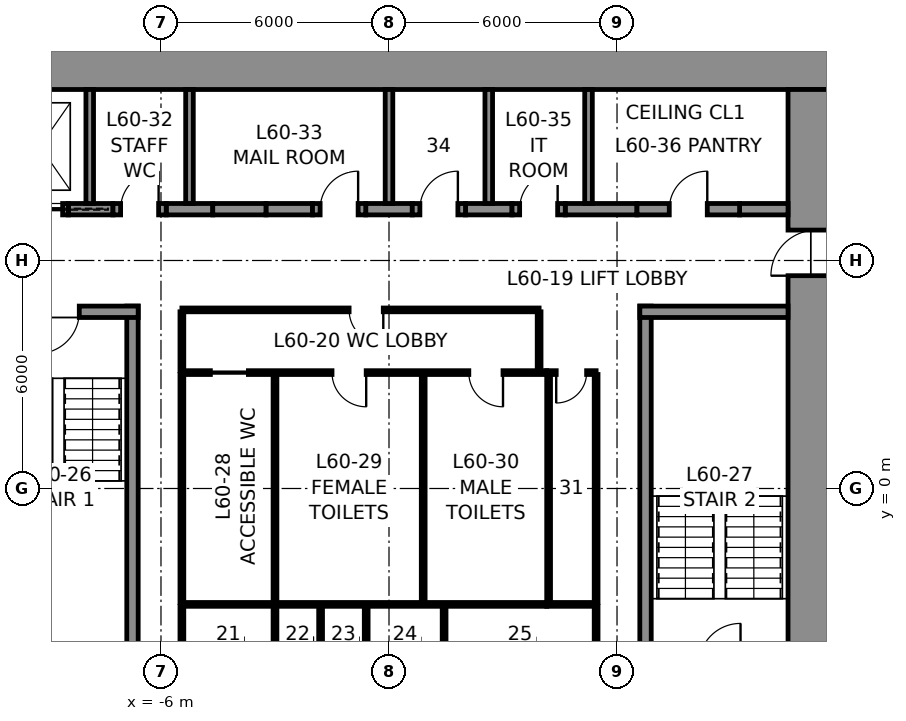
"""IFC4 building model, lengths in metres.
Left out: names, types, materials, properties, quantities, classifications, styles, units other than length and angle.
Written with IfcOpenShell. Run it as: python <this file> out.ifc"""

import sys

from ifc_helpers import new_model, si_unit, direction, frame, frame_2d, origin, place, context, subcontext, project, spatial, rectangle, extrude, element, fill, save


model = new_model("IFC4")
c1 = context("Model", 3, precision=1e-05, world=origin(), true_north=direction((0.0, 1.0)))
c2 = subcontext(c1, "Body", "Model", "MODEL_VIEW")
j1 = project(units=[si_unit("LENGTHUNIT", "METRE"), si_unit("PLANEANGLEUNIT", "RADIAN")], contexts=[c1])
p1 = place(None, origin())
s1 = spatial("IfcSite", under=j1, at=p1, CompositionType="ELEMENT")
p2 = place(p1, origin())
s2 = spatial("IfcBuilding", under=s1, at=p2, CompositionType="ELEMENT")
p3 = place(p2, frame((0.0, 0.0, 269.8)))
s3 = spatial("IfcBuildingStorey", under=s2, at=p3, CompositionType="ELEMENT", Elevation=269.8)
p4 = place(p3, frame((-12.0, 11.25, 0.0), z_axis=(0.0, 0.0, 1.0), x_axis=(1.0, 0.0, 0.0)))
e1 = element("IfcWall", 1, at=p4, inside=s3, PredefinedType="SHEAR", context=c2, shape_type="SweptSolid", body=[
    extrude(rectangle(XDim=24.0, YDim=1.5, at=frame_2d((12.0, 0.0))), origin(), (0.0, 0.0, 1.0), 4.0),
])
p5 = place(p3, frame((11.25, 10.5, 0.0), z_axis=(0.0, 0.0, 1.0), x_axis=(0.0, -1.0, 0.0)))
e2 = element("IfcWall", 2, at=p5, inside=s3, PredefinedType="SHEAR", context=c2, shape_type="SweptSolid", body=[
    extrude(rectangle(XDim=21.0, YDim=1.5, at=frame_2d((10.5, 0.0))), origin(), (0.0, 0.0, 1.0), 4.0),
])
p6 = place(p5, frame((3.7, 0.0, 0.0)))
e3 = element("IfcOpeningElement", 3, at=p6, cuts=e2, PredefinedType="OPENING", context=c2, shape_type="SweptSolid", body=[
    extrude(rectangle(XDim=1.2, YDim=2.3, at=frame_2d((0.6, 1.15))), frame((0.0, 0.76, 0.0), z_axis=(0.0, -1.0, 0.0), x_axis=(1.0, 0.0, 0.0)), (0.0, 0.0, 1.0), 1.52),
])
p7 = place(p5, frame((16.1, 0.0, 0.0)))
e4 = element("IfcOpeningElement", 4, at=p7, cuts=e2, PredefinedType="OPENING", context=c2, shape_type="SweptSolid", body=[
    extrude(rectangle(XDim=1.2, YDim=2.3, at=frame_2d((0.6, 1.15))), frame((0.0, 0.76, 0.0), z_axis=(0.0, -1.0, 0.0), x_axis=(1.0, 0.0, 0.0)), (0.0, 0.0, 1.0), 1.52),
])
p8 = place(p3, frame((-8.438, 7.35, 0.0), z_axis=(0.0, 0.0, 1.0), x_axis=(1.0, 0.0, 0.0)))
e5 = element("IfcWall", 5, at=p8, inside=s3, PredefinedType="SHEAR", context=c2, shape_type="SweptSolid", body=[
    extrude(rectangle(XDim=1.175, YDim=0.3, at=frame_2d((0.587, 0.0))), origin(), (0.0, 0.0, 1.0), 4.0),
])
for number, where, z_axis, x_axis in (
    (6, (-5.863, 7.35, 0.0), (0.0, 0.0, 1.0), (1.0, 0.0, 0.0)),
    (7, (-3.238, 7.35, 0.0), (0.0, 0.0, 1.0), (1.0, 0.0, 0.0)),
    (8, (-0.613, 7.35, 0.0), (0.0, 0.0, 1.0), (1.0, 0.0, 0.0)),
    (9, (2.012, 7.35, 0.0), (0.0, 0.0, 1.0), (1.0, 0.0, 0.0)),
):
    element("IfcWall", number, at=place(p3, frame(where, z_axis=z_axis, x_axis=x_axis)), inside=s3, PredefinedType="SHEAR", context=c2, shape_type="SweptSolid", body=[
        extrude(rectangle(XDim=1.225, YDim=0.3, at=frame_2d((0.613, 0.0))), origin(), (0.0, 0.0, 1.0), 4.0),
    ])
p9 = place(p3, frame((4.637, 7.35, 0.0), z_axis=(0.0, 0.0, 1.0), x_axis=(1.0, 0.0, 0.0)))
e10 = element("IfcWall", 10, at=p9, inside=s3, PredefinedType="SHEAR", context=c2, shape_type="SweptSolid", body=[
    extrude(rectangle(XDim=1.887, YDim=0.3, at=frame_2d((0.944, 0.0))), origin(), (0.0, 0.0, 1.0), 4.0),
])
p10 = place(p3, frame((9.225, 7.35, 0.0), z_axis=(0.0, 0.0, 1.0), x_axis=(1.0, 0.0, 0.0)))
e11 = element("IfcWall", 11, at=p10, inside=s3, PredefinedType="SHEAR", context=c2, shape_type="SweptSolid", body=[
    extrude(rectangle(XDim=1.275, YDim=0.3, at=frame_2d((0.637, 0.0))), origin(), (0.0, 0.0, 1.0), 4.0),
])
p11 = place(p3, frame((-9.938, 7.35, 0.0), z_axis=(0.0, 0.0, 1.0), x_axis=(1.0, 0.0, 0.0)))
e12 = element("IfcWall", 12, at=p11, inside=s3, PredefinedType="PARTITIONING", context=c2, shape_type="SweptSolid", body=[
    extrude(rectangle(XDim=1.5, YDim=0.3, at=frame_2d((0.75, 0.0))), origin(), (0.0, 0.0, 1.0), 4.0),
])
p12 = place(p11, frame((0.15, 0.0, 0.0)))
e13 = element("IfcOpeningElement", 13, at=p12, cuts=e12, PredefinedType="OPENING", context=c2, shape_type="SweptSolid", body=[
    extrude(rectangle(XDim=1.2, YDim=2.3, at=frame_2d((0.6, 1.15))), frame((0.0, 0.16, 0.0), z_axis=(0.0, -1.0, 0.0), x_axis=(1.0, 0.0, 0.0)), (0.0, 0.0, 1.0), 0.32),
])
p13 = place(p3, frame((-7.262, 7.35, 0.0), z_axis=(0.0, 0.0, 1.0), x_axis=(1.0, 0.0, 0.0)))
e14 = element("IfcWall", 14, at=p13, inside=s3, PredefinedType="PARTITIONING", context=c2, shape_type="SweptSolid", body=[
    extrude(rectangle(XDim=1.4, YDim=0.3, at=frame_2d((0.7, 0.0))), origin(), (0.0, 0.0, 1.0), 4.0),
])
p14 = place(p13, frame((0.2, 0.0, 0.0)))
e15 = element("IfcOpeningElement", 15, at=p14, cuts=e14, PredefinedType="OPENING", context=c2, shape_type="SweptSolid", body=[
    extrude(rectangle(XDim=1.0, YDim=2.3, at=frame_2d((0.5, 1.15))), frame((0.0, 0.16, 0.0), z_axis=(0.0, -1.0, 0.0), x_axis=(1.0, 0.0, 0.0)), (0.0, 0.0, 1.0), 0.32),
])
p15 = place(p3, frame((-4.637, 7.35, 0.0), z_axis=(0.0, 0.0, 1.0), x_axis=(1.0, 0.0, 0.0)))
e16 = element("IfcWall", 16, at=p15, inside=s3, PredefinedType="PARTITIONING", context=c2, shape_type="SweptSolid", body=[
    extrude(rectangle(XDim=1.4, YDim=0.3, at=frame_2d((0.7, 0.0))), origin(), (0.0, 0.0, 1.0), 4.0),
])
p16 = place(p3, frame((-2.012, 7.35, 0.0), z_axis=(0.0, 0.0, 1.0), x_axis=(1.0, 0.0, 0.0)))
e17 = element("IfcWall", 17, at=p16, inside=s3, PredefinedType="PARTITIONING", context=c2, shape_type="SweptSolid", body=[
    extrude(rectangle(XDim=1.4, YDim=0.3, at=frame_2d((0.7, 0.0))), origin(), (0.0, 0.0, 1.0), 4.0),
])
p17 = place(p16, frame((0.2, 0.0, 0.0)))
e18 = element("IfcOpeningElement", 18, at=p17, cuts=e17, PredefinedType="OPENING", context=c2, shape_type="SweptSolid", body=[
    extrude(rectangle(XDim=1.0, YDim=2.3, at=frame_2d((0.5, 1.15))), frame((0.0, 0.16, 0.0), z_axis=(0.0, -1.0, 0.0), x_axis=(1.0, 0.0, 0.0)), (0.0, 0.0, 1.0), 0.32),
])
p18 = place(p3, frame((0.613, 7.35, 0.0), z_axis=(0.0, 0.0, 1.0), x_axis=(1.0, 0.0, 0.0)))
e19 = element("IfcWall", 19, at=p18, inside=s3, PredefinedType="PARTITIONING", context=c2, shape_type="SweptSolid", body=[
    extrude(rectangle(XDim=1.4, YDim=0.3, at=frame_2d((0.7, 0.0))), origin(), (0.0, 0.0, 1.0), 4.0),
])
p19 = place(p18, frame((0.2, 0.0, 0.0)))
e20 = element("IfcOpeningElement", 20, at=p19, cuts=e19, PredefinedType="OPENING", context=c2, shape_type="SweptSolid", body=[
    extrude(rectangle(XDim=1.0, YDim=2.3, at=frame_2d((0.5, 1.15))), frame((0.0, 0.16, 0.0), z_axis=(0.0, -1.0, 0.0), x_axis=(1.0, 0.0, 0.0)), (0.0, 0.0, 1.0), 0.32),
])
p20 = place(p3, frame((3.238, 7.35, 0.0), z_axis=(0.0, 0.0, 1.0), x_axis=(1.0, 0.0, 0.0)))
e21 = element("IfcWall", 21, at=p20, inside=s3, PredefinedType="PARTITIONING", context=c2, shape_type="SweptSolid", body=[
    extrude(rectangle(XDim=1.4, YDim=0.3, at=frame_2d((0.7, 0.0))), origin(), (0.0, 0.0, 1.0), 4.0),
])
p21 = place(p20, frame((0.2, 0.0, 0.0)))
e22 = element("IfcOpeningElement", 22, at=p21, cuts=e21, PredefinedType="OPENING", context=c2, shape_type="SweptSolid", body=[
    extrude(rectangle(XDim=1.0, YDim=2.3, at=frame_2d((0.5, 1.15))), frame((0.0, 0.16, 0.0), z_axis=(0.0, -1.0, 0.0), x_axis=(1.0, 0.0, 0.0)), (0.0, 0.0, 1.0), 0.32),
])
p22 = place(p3, frame((6.525, 7.35, 0.0), z_axis=(0.0, 0.0, 1.0), x_axis=(1.0, 0.0, 0.0)))
e23 = element("IfcWall", 23, at=p22, inside=s3, PredefinedType="PARTITIONING", context=c2, shape_type="SweptSolid", body=[
    extrude(rectangle(XDim=2.7, YDim=0.3, at=frame_2d((1.35, 0.0))), origin(), (0.0, 0.0, 1.0), 4.0),
])
p23 = place(p22, frame((0.85, 0.0, 0.0)))
e24 = element("IfcOpeningElement", 24, at=p23, cuts=e23, PredefinedType="OPENING", context=c2, shape_type="SweptSolid", body=[
    extrude(rectangle(XDim=1.0, YDim=2.3, at=frame_2d((0.5, 1.15))), frame((0.0, 0.16, 0.0), z_axis=(0.0, -1.0, 0.0), x_axis=(1.0, 0.0, 0.0)), (0.0, 0.0, 1.0), 0.32),
])
for number, where, z_axis, x_axis in (
    (25, (-7.875, 7.5, 0.0), (0.0, 0.0, 1.0), (0.0, 1.0, 0.0)),
    (26, (-5.25, 7.5, 0.0), (0.0, 0.0, 1.0), (0.0, 1.0, 0.0)),
    (27, (0.0, 7.5, 0.0), (0.0, 0.0, 1.0), (0.0, 1.0, 0.0)),
    (28, (2.625, 7.5, 0.0), (0.0, 0.0, 1.0), (0.0, 1.0, 0.0)),
    (29, (5.25, 7.5, 0.0), (0.0, 0.0, 1.0), (0.0, 1.0, 0.0)),
):
    element("IfcWall", number, at=place(p3, frame(where, z_axis=z_axis, x_axis=x_axis)), inside=s3, PredefinedType="PARTITIONING", context=c2, shape_type="SweptSolid", body=[
        extrude(rectangle(XDim=3.0, YDim=0.2, at=frame_2d((1.5, 0.0))), origin(), (0.0, 0.0, 1.0), 4.0),
    ])
p24 = place(p3, frame((-6.75, -4.8, 0.0), z_axis=(0.0, 0.0, 1.0), x_axis=(0.0, 1.0, 0.0)))
e30 = element("IfcWall", 30, at=p24, inside=s3, PredefinedType="SOLIDWALL", context=c2, shape_type="SweptSolid", body=[
    extrude(rectangle(XDim=9.6, YDim=0.3, at=frame_2d((4.8, 0.0))), origin(), (0.0, 0.0, 1.0), 3.75),
])
p25 = place(p3, frame((-10.5, 4.65, 0.0), z_axis=(0.0, 0.0, 1.0), x_axis=(1.0, 0.0, 0.0)))
e31 = element("IfcWall", 31, at=p25, inside=s3, PredefinedType="SOLIDWALL", context=c2, shape_type="SweptSolid", body=[
    extrude(rectangle(XDim=3.9, YDim=0.3, at=frame_2d((1.95, 0.0))), origin(), (0.0, 0.0, 1.0), 3.75),
])
p26 = place(p25, frame((1.25, 0.0, 0.0)))
e32 = element("IfcOpeningElement", 32, at=p26, cuts=e31, PredefinedType="OPENING", context=c2, shape_type="SweptSolid", body=[
    extrude(rectangle(XDim=1.1, YDim=2.3, at=frame_2d((0.55, 1.15))), frame((0.0, 0.16, 0.0), z_axis=(0.0, -1.0, 0.0), x_axis=(1.0, 0.0, 0.0)), (0.0, 0.0, 1.0), 0.32),
])
p27 = place(p3, frame((6.75, -4.8, 0.0), z_axis=(0.0, 0.0, 1.0), x_axis=(0.0, 1.0, 0.0)))
e33 = element("IfcWall", 33, at=p27, inside=s3, PredefinedType="SOLIDWALL", context=c2, shape_type="SweptSolid", body=[
    extrude(rectangle(XDim=9.6, YDim=0.3, at=frame_2d((4.8, 0.0))), origin(), (0.0, 0.0, 1.0), 3.75),
])
p28 = place(p3, frame((6.6, 4.65, 0.0), z_axis=(0.0, 0.0, 1.0), x_axis=(1.0, 0.0, 0.0)))
e34 = element("IfcWall", 34, at=p28, inside=s3, PredefinedType="SOLIDWALL", context=c2, shape_type="SweptSolid", body=[
    extrude(rectangle(XDim=3.9, YDim=0.3, at=frame_2d((1.95, 0.0))), origin(), (0.0, 0.0, 1.0), 3.75),
])
p29 = place(p3, frame((-5.45, 3.05, 0.0), z_axis=(0.0, 0.0, 1.0), x_axis=(1.0, 0.0, 0.0)))
e35 = element("IfcWall", 35, at=p29, inside=s3, PredefinedType="PARTITIONING", context=c2, shape_type="SweptSolid", body=[
    extrude(rectangle(XDim=9.6, YDim=0.1, at=frame_2d((4.8, 0.0))), origin(), (0.0, 0.0, 1.0), 3.75),
])
p30 = place(p29, frame((0.75, 0.0, 0.0)))
e36 = element("IfcOpeningElement", 36, at=p30, cuts=e35, PredefinedType="OPENING", context=c2, shape_type="SweptSolid", body=[
    extrude(rectangle(XDim=1.0, YDim=2.3, at=frame_2d((0.5, 1.15))), frame((0.0, 0.06, 0.0), z_axis=(0.0, -1.0, 0.0), x_axis=(1.0, 0.0, 0.0)), (0.0, 0.0, 1.0), 0.12),
])
p31 = place(p29, frame((3.95, 0.0, 0.0)))
e37 = element("IfcOpeningElement", 37, at=p31, cuts=e35, PredefinedType="OPENING", context=c2, shape_type="SweptSolid", body=[
    extrude(rectangle(XDim=0.9, YDim=2.3, at=frame_2d((0.45, 1.15))), frame((0.0, 0.06, 0.0), z_axis=(0.0, -1.0, 0.0), x_axis=(1.0, 0.0, 0.0)), (0.0, 0.0, 1.0), 0.12),
])
p32 = place(p29, frame((7.55, 0.0, 0.0)))
e38 = element("IfcOpeningElement", 38, at=p32, cuts=e35, PredefinedType="OPENING", context=c2, shape_type="SweptSolid", body=[
    extrude(rectangle(XDim=0.9, YDim=2.3, at=frame_2d((0.45, 1.15))), frame((0.0, 0.06, 0.0), z_axis=(0.0, -1.0, 0.0), x_axis=(1.0, 0.0, 0.0)), (0.0, 0.0, 1.0), 0.12),
])
p33 = place(p3, frame((4.15, 3.05, 0.0), z_axis=(0.0, 0.0, 1.0), x_axis=(1.0, 0.0, 0.0)))
e39 = element("IfcWall", 39, at=p33, inside=s3, PredefinedType="PARTITIONING", context=c2, shape_type="SweptSolid", body=[
    extrude(rectangle(XDim=1.3, YDim=0.1, at=frame_2d((0.65, 0.0))), origin(), (0.0, 0.0, 1.0), 3.75),
])
p34 = place(p33, frame((0.25, 0.0, 0.0)))
e40 = element("IfcOpeningElement", 40, at=p34, cuts=e39, PredefinedType="OPENING", context=c2, shape_type="SweptSolid", body=[
    extrude(rectangle(XDim=0.8, YDim=2.3, at=frame_2d((0.4, 1.15))), frame((0.0, 0.06, 0.0), z_axis=(0.0, -1.0, 0.0), x_axis=(1.0, 0.0, 0.0)), (0.0, 0.0, 1.0), 0.12),
])
p35 = place(p3, frame((4.15, -3.05, 0.0), z_axis=(0.0, 0.0, 1.0), x_axis=(-1.0, 0.0, 0.0)))
e41 = element("IfcWall", 41, at=p35, inside=s3, PredefinedType="PARTITIONING", context=c2, shape_type="SweptSolid", body=[
    extrude(rectangle(XDim=9.6, YDim=0.1, at=frame_2d((4.8, 0.0))), origin(), (0.0, 0.0, 1.0), 3.75),
])
p36 = place(p3, frame((5.45, -3.05, 0.0), z_axis=(0.0, 0.0, 1.0), x_axis=(-1.0, 0.0, 0.0)))
e42 = element("IfcWall", 42, at=p36, inside=s3, PredefinedType="PARTITIONING", context=c2, shape_type="SweptSolid", body=[
    extrude(rectangle(XDim=1.3, YDim=0.1, at=frame_2d((0.65, 0.0))), origin(), (0.0, 0.0, 1.0), 3.75),
])
for number, where, z_axis, x_axis in (
    (43, (5.45, 3.0, 0.0), (0.0, 0.0, 1.0), (0.0, -1.0, 0.0)),
    (44, (-5.45, -3.0, 0.0), (0.0, 0.0, 1.0), (0.0, 1.0, 0.0)),
    (45, (-3.0, -3.0, 0.0), (0.0, 0.0, 1.0), (0.0, 1.0, 0.0)),
    (46, (0.9, -3.0, 0.0), (0.0, 0.0, 1.0), (0.0, 1.0, 0.0)),
    (47, (4.2, -3.0, 0.0), (0.0, 0.0, 1.0), (0.0, 1.0, 0.0)),
):
    element("IfcWall", number, at=place(p3, frame(where, z_axis=z_axis, x_axis=x_axis)), inside=s3, PredefinedType="PARTITIONING", context=c2, shape_type="SweptSolid", body=[
        extrude(rectangle(XDim=6.0, YDim=0.1, at=frame_2d((3.0, 0.0))), origin(), (0.0, 0.0, 1.0), 3.75),
    ])
p37 = place(p3, frame((-5.45, 4.7, 0.0), z_axis=(0.0, 0.0, 1.0), x_axis=(1.0, 0.0, 0.0)))
e48 = element("IfcWall", 48, at=p37, inside=s3, PredefinedType="PARTITIONING", context=c2, shape_type="SweptSolid", body=[
    extrude(rectangle(XDim=9.4, YDim=0.1, at=frame_2d((4.7, 0.0))), origin(), (0.0, 0.0, 1.0), 3.75),
])
p38 = place(p37, frame((4.4, 0.0, 0.0)))
e49 = element("IfcOpeningElement", 49, at=p38, cuts=e48, PredefinedType="OPENING", context=c2, shape_type="SweptSolid", body=[
    extrude(rectangle(XDim=0.9, YDim=2.3, at=frame_2d((0.45, 1.15))), frame((0.0, 0.06, 0.0), z_axis=(0.0, -1.0, 0.0), x_axis=(1.0, 0.0, 0.0)), (0.0, 0.0, 1.0), 0.12),
])
for number, where, z_axis, x_axis in (
    (50, (-5.45, 3.1, 0.0), (0.0, 0.0, 1.0), (0.0, 1.0, 0.0)),
    (51, (3.95, 3.1, 0.0), (0.0, 0.0, 1.0), (0.0, 1.0, 0.0)),
    (52, (-5.45, -3.1, 0.0), (0.0, 0.0, 1.0), (0.0, -1.0, 0.0)),
    (53, (5.45, -3.1, 0.0), (0.0, 0.0, 1.0), (0.0, -1.0, 0.0)),
    (54, (-3.0, -3.1, 0.0), (0.0, 0.0, 1.0), (0.0, -1.0, 0.0)),
    (55, (-1.8, -3.1, 0.0), (0.0, 0.0, 1.0), (0.0, -1.0, 0.0)),
    (56, (-0.6, -3.1, 0.0), (0.0, 0.0, 1.0), (0.0, -1.0, 0.0)),
    (57, (1.45, -3.1, 0.0), (0.0, 0.0, 1.0), (0.0, -1.0, 0.0)),
):
    element("IfcWall", number, at=place(p3, frame(where, z_axis=z_axis, x_axis=x_axis)), inside=s3, PredefinedType="PARTITIONING", context=c2, shape_type="SweptSolid", body=[
        extrude(rectangle(XDim=1.55, YDim=0.1, at=frame_2d((0.775, 0.0))), origin(), (0.0, 0.0, 1.0), 3.75),
    ])
p39 = place(p26, frame((1.1, 0.0, 0.0), z_axis=(0.0, 0.0, 1.0), x_axis=(-1.0, 0.0, 0.0)))
e58 = element("IfcDoor", 58, at=p39, inside=s3, OperationType="SINGLE_SWING_RIGHT", PredefinedType="DOOR", context=c2, shape_type="SweptSolid", body=[
    extrude(rectangle(XDim=1.1, YDim=2.3, at=frame_2d((0.55, 1.15))), frame((0.0, 0.025, 0.0), z_axis=(0.0, -1.0, 0.0), x_axis=(1.0, 0.0, 0.0)), (0.0, 0.0, 1.0), 0.05),
])
fill(e32, e58)
p40 = place(p30, frame((1.0, 0.0, 0.0), z_axis=(0.0, 0.0, 1.0), x_axis=(-1.0, 0.0, 0.0)))
e59 = element("IfcDoor", 59, at=p40, inside=s3, OperationType="SLIDING_TO_LEFT", PredefinedType="DOOR", context=c2, shape_type="SweptSolid", body=[
    extrude(rectangle(XDim=1.0, YDim=2.3, at=frame_2d((0.5, 1.15))), frame((0.0, 0.025, 0.0), z_axis=(0.0, -1.0, 0.0), x_axis=(1.0, 0.0, 0.0)), (0.0, 0.0, 1.0), 0.05),
])
fill(e36, e59)
p41 = place(p31, frame((0.9, 0.0, 0.0), z_axis=(0.0, 0.0, 1.0), x_axis=(-1.0, 0.0, 0.0)))
e60 = element("IfcDoor", 60, at=p41, inside=s3, OperationType="SINGLE_SWING_LEFT", PredefinedType="DOOR", context=c2, shape_type="SweptSolid", body=[
    extrude(rectangle(XDim=0.9, YDim=2.3, at=frame_2d((0.45, 1.15))), frame((0.0, 0.025, 0.0), z_axis=(0.0, -1.0, 0.0), x_axis=(1.0, 0.0, 0.0)), (0.0, 0.0, 1.0), 0.05),
])
fill(e37, e60)
p42 = place(p32, frame((0.9, 0.0, 0.0), z_axis=(0.0, 0.0, 1.0), x_axis=(-1.0, 0.0, 0.0)))
e61 = element("IfcDoor", 61, at=p42, inside=s3, OperationType="SINGLE_SWING_LEFT", PredefinedType="DOOR", context=c2, shape_type="SweptSolid", body=[
    extrude(rectangle(XDim=0.9, YDim=2.3, at=frame_2d((0.45, 1.15))), frame((0.0, 0.025, 0.0), z_axis=(0.0, -1.0, 0.0), x_axis=(1.0, 0.0, 0.0)), (0.0, 0.0, 1.0), 0.05),
])
fill(e38, e61)
p43 = place(p34, frame((0.8, 0.0, 0.0), z_axis=(0.0, 0.0, 1.0), x_axis=(-1.0, 0.0, 0.0)))
e62 = element("IfcDoor", 62, at=p43, inside=s3, OperationType="SINGLE_SWING_RIGHT", PredefinedType="DOOR", context=c2, shape_type="SweptSolid", body=[
    extrude(rectangle(XDim=0.8, YDim=2.3, at=frame_2d((0.4, 1.15))), frame((0.0, 0.025, 0.0), z_axis=(0.0, -1.0, 0.0), x_axis=(1.0, 0.0, 0.0)), (0.0, 0.0, 1.0), 0.05),
])
fill(e40, e62)
p44 = place(p38, frame((0.9, 0.0, 0.0), z_axis=(0.0, 0.0, 1.0), x_axis=(-1.0, 0.0, 0.0)))
e63 = element("IfcDoor", 63, at=p44, inside=s3, OperationType="SINGLE_SWING_LEFT", PredefinedType="DOOR", context=c2, shape_type="SweptSolid", body=[
    extrude(rectangle(XDim=0.9, YDim=2.3, at=frame_2d((0.45, 1.15))), frame((0.0, 0.025, 0.0), z_axis=(0.0, -1.0, 0.0), x_axis=(1.0, 0.0, 0.0)), (0.0, 0.0, 1.0), 0.05),
])
fill(e49, e63)
p45 = place(p14, origin())
e64 = element("IfcDoor", 64, at=p45, inside=s3, OperationType="SINGLE_SWING_RIGHT", PredefinedType="DOOR", context=c2, shape_type="SweptSolid", body=[
    extrude(rectangle(XDim=1.0, YDim=2.3, at=frame_2d((0.5, 1.15))), frame((0.0, 0.025, 0.0), z_axis=(0.0, -1.0, 0.0), x_axis=(1.0, 0.0, 0.0)), (0.0, 0.0, 1.0), 0.05),
])
fill(e15, e64)
p46 = place(p17, origin())
e65 = element("IfcDoor", 65, at=p46, inside=s3, OperationType="SINGLE_SWING_RIGHT", PredefinedType="DOOR", context=c2, shape_type="SweptSolid", body=[
    extrude(rectangle(XDim=1.0, YDim=2.3, at=frame_2d((0.5, 1.15))), frame((0.0, 0.025, 0.0), z_axis=(0.0, -1.0, 0.0), x_axis=(1.0, 0.0, 0.0)), (0.0, 0.0, 1.0), 0.05),
])
fill(e18, e65)
p47 = place(p19, origin())
e66 = element("IfcDoor", 66, at=p47, inside=s3, OperationType="SINGLE_SWING_RIGHT", PredefinedType="DOOR", context=c2, shape_type="SweptSolid", body=[
    extrude(rectangle(XDim=1.0, YDim=2.3, at=frame_2d((0.5, 1.15))), frame((0.0, 0.025, 0.0), z_axis=(0.0, -1.0, 0.0), x_axis=(1.0, 0.0, 0.0)), (0.0, 0.0, 1.0), 0.05),
])
fill(e20, e66)
p48 = place(p21, origin())
e67 = element("IfcDoor", 67, at=p48, inside=s3, OperationType="SINGLE_SWING_RIGHT", PredefinedType="DOOR", context=c2, shape_type="SweptSolid", body=[
    extrude(rectangle(XDim=1.0, YDim=2.3, at=frame_2d((0.5, 1.15))), frame((0.0, 0.025, 0.0), z_axis=(0.0, -1.0, 0.0), x_axis=(1.0, 0.0, 0.0)), (0.0, 0.0, 1.0), 0.05),
])
fill(e22, e67)
p49 = place(p23, origin())
e68 = element("IfcDoor", 68, at=p49, inside=s3, OperationType="SINGLE_SWING_RIGHT", PredefinedType="DOOR", context=c2, shape_type="SweptSolid", body=[
    extrude(rectangle(XDim=1.0, YDim=2.3, at=frame_2d((0.5, 1.15))), frame((0.0, 0.025, 0.0), z_axis=(0.0, -1.0, 0.0), x_axis=(1.0, 0.0, 0.0)), (0.0, 0.0, 1.0), 0.05),
])
fill(e24, e68)
p50 = place(p6, frame((1.2, 0.0, 0.0), z_axis=(0.0, 0.0, 1.0), x_axis=(-1.0, 0.0, 0.0)))
e69 = element("IfcDoor", 69, at=p50, inside=s3, OperationType="SINGLE_SWING_LEFT", PredefinedType="DOOR", context=c2, shape_type="SweptSolid", body=[
    extrude(rectangle(XDim=1.2, YDim=2.3, at=frame_2d((0.6, 1.15))), frame((0.0, 0.025, 0.0), z_axis=(0.0, -1.0, 0.0), x_axis=(1.0, 0.0, 0.0)), (0.0, 0.0, 1.0), 0.05),
])
fill(e3, e69)
p51 = place(p12, frame((1.2, 0.0, 0.0), z_axis=(0.0, 0.0, 1.0), x_axis=(-1.0, 0.0, 0.0)))
e70 = element("IfcDoor", 70, at=p51, inside=s3, OperationType="SLIDING_TO_LEFT", PredefinedType="DOOR", context=c2, shape_type="SweptSolid", body=[
    extrude(rectangle(XDim=1.2, YDim=2.3, at=frame_2d((0.6, 1.15))), frame((0.0, 0.025, 0.0), z_axis=(0.0, -1.0, 0.0), x_axis=(1.0, 0.0, 0.0)), (0.0, 0.0, 1.0), 0.05),
])
fill(e13, e70)
save(model, sys.argv[1])
